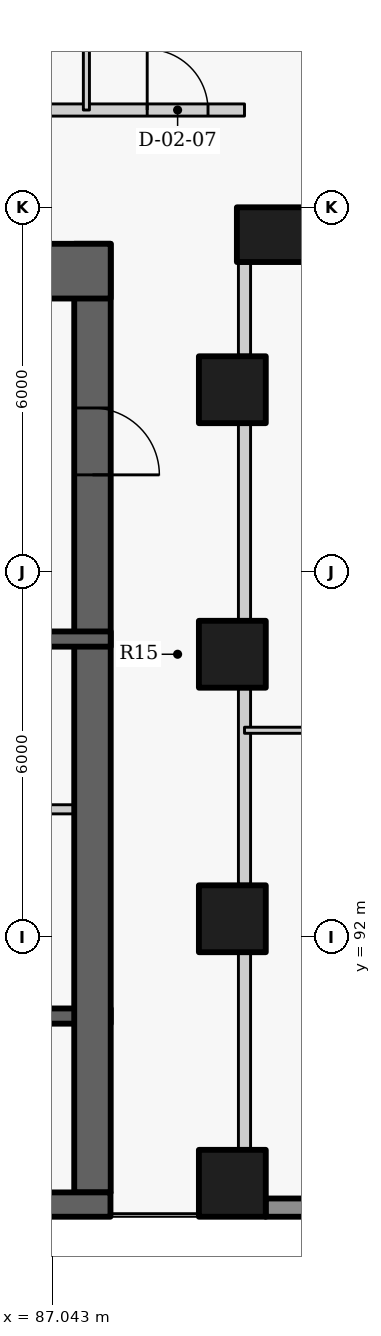
"""IFC4 building model, lengths in metres.
Left out: names, types, materials, properties, quantities, classifications, styles, units other than length and angle.
Written with IfcOpenShell. Run it as: python <this file> out.ifc"""

import sys

from ifc_helpers import new_model, si_unit, direction, frame, frame_2d, origin, origin_2d, place, context, subcontext, project, spatial, rectangle, extrude, element, fill, save


model = new_model("IFC4")
c1 = context("Model", 3, precision=1e-05, world=origin(), true_north=direction((0.0, 1.0)))
c2 = subcontext(c1, "Body", "Model", "MODEL_VIEW")
j1 = project(units=[si_unit("LENGTHUNIT", "METRE"), si_unit("PLANEANGLEUNIT", "RADIAN")], contexts=[c1])
p1 = place(None, origin())
s1 = spatial("IfcSite", under=j1, at=p1, CompositionType="ELEMENT")
p2 = place(p1, origin())
s2 = spatial("IfcBuilding", under=s1, at=p2, CompositionType="ELEMENT")
p3 = place(p2, frame((0.0, 0.0, 24.0)))
s3 = spatial("IfcBuildingStorey", under=s2, at=p3, CompositionType="ELEMENT", Elevation=24.0)
p4 = place(p3, frame((90.825, 103.55, 0.0), z_axis=(0.0, 0.0, 1.0), x_axis=(-1.0, 0.0, 0.0)))
e1 = element("IfcColumn", 1, at=p4, inside=s3, PredefinedType="COLUMN", context=c2, shape_type="SweptSolid", body=[
    extrude(rectangle(XDim=1.5, YDim=0.9, at=origin_2d()), origin(), (0.0, 0.0, 1.0), 4.2),
])
for number, where, z_axis, x_axis in (
    (2, (90.0, 87.95, 0.0), (0.0, 0.0, 1.0), (0.0, 1.0, 0.0)),
    (3, (90.0, 92.3, 0.0), (0.0, 0.0, 1.0), (0.0, 1.0, 0.0)),
    (4, (90.0, 96.65, 0.0), (0.0, 0.0, 1.0), (0.0, 1.0, 0.0)),
    (5, (90.0, 101.0, 0.0), (0.0, 0.0, 1.0), (0.0, 1.0, 0.0)),
):
    element("IfcColumn", number, at=place(p3, frame(where, z_axis=z_axis, x_axis=x_axis)), inside=s3, PredefinedType="COLUMN", context=c2, shape_type="SweptSolid", body=[
        extrude(rectangle(XDim=1.1, YDim=1.1, at=origin_2d()), origin(), (0.0, 0.0, 1.0), 4.2),
    ])
p5 = place(p3, frame((90.546, 87.55, 0.0), z_axis=(0.0, 0.0, 1.0), x_axis=(1.0, 0.0, 0.0)))
e6 = element("IfcWall", 6, at=p5, inside=s3, PredefinedType="SOLIDWALL", context=c2, shape_type="SweptSolid", body=[
    extrude(rectangle(XDim=6.016, YDim=0.3, at=frame_2d((3.008, 0.0))), origin(), (0.0, 0.0, 1.0), 3.325),
])
p6 = place(p5, frame((1.958, 0.0, 0.9)))
e7 = element("IfcOpeningElement", 7, at=p6, cuts=e6, PredefinedType="OPENING", context=c2, shape_type="SweptSolid", body=[
    extrude(rectangle(XDim=2.1, YDim=2.05, at=frame_2d((1.05, 1.025))), frame((0.0, 0.16, 0.0), z_axis=(0.0, -1.0, 0.0), x_axis=(1.0, 0.0, 0.0)), (0.0, 0.0, 1.0), 0.32),
])
p7 = place(p3, frame((88.0, 90.7, -0.3), z_axis=(0.0, 0.0, 1.0), x_axis=(-1.0, 0.0, 0.0)))
e8 = element("IfcWall", 8, at=p7, inside=s3, PredefinedType="SHEAR", context=c2, shape_type="SweptSolid", body=[
    extrude(rectangle(XDim=2.6, YDim=0.25, at=frame_2d((1.3, 0.0))), origin(), (0.0, 0.0, 1.0), 4.225),
])
p8 = place(p7, frame((1.175, 0.0, 0.3)))
e9 = element("IfcOpeningElement", 9, at=p8, cuts=e8, PredefinedType="OPENING", context=c2, shape_type="SweptSolid", body=[
    extrude(rectangle(XDim=0.9, YDim=2.1, at=frame_2d((0.45, 1.05))), frame((0.0, 0.135, 0.0), z_axis=(0.0, -1.0, 0.0), x_axis=(1.0, 0.0, 0.0)), (0.0, 0.0, 1.0), 0.27),
])
p9 = place(p3, frame((87.7, 103.4, -0.3), z_axis=(0.0, 0.0, 1.0), x_axis=(0.0, -1.0, 0.0)))
e10 = element("IfcWall", 10, at=p9, inside=s3, PredefinedType="SHEAR", context=c2, shape_type="SweptSolid", body=[
    extrude(rectangle(XDim=15.6, YDim=0.6, at=frame_2d((7.8, 0.0))), origin(), (0.0, 0.0, 1.0), 4.225),
])
p10 = place(p9, frame((2.7, 0.0, 0.3)))
e11 = element("IfcOpeningElement", 11, at=p10, cuts=e10, PredefinedType="OPENING", context=c2, shape_type="SweptSolid", body=[
    extrude(rectangle(XDim=1.1, YDim=2.1, at=frame_2d((0.55, 1.05))), frame((0.0, 0.31, 0.0), z_axis=(0.0, -1.0, 0.0), x_axis=(1.0, 0.0, 0.0)), (0.0, 0.0, 1.0), 0.62),
])
p11 = place(p3, frame((85.397, 94.1, 0.0), z_axis=(0.0, 0.0, 1.0), x_axis=(1.0, 0.0, 0.0)))
e12 = element("IfcWall", 12, at=p11, inside=s3, PredefinedType="PARTITIONING", context=c2, shape_type="SweptSolid", body=[
    extrude(rectangle(XDim=2.603, YDim=0.15, at=frame_2d((1.302, 0.0))), origin(), (0.0, 0.0, 1.0), 3.925),
])
p12 = place(p11, frame((0.528, 0.0, 0.0)))
e13 = element("IfcOpeningElement", 13, at=p12, cuts=e12, PredefinedType="OPENING", context=c2, shape_type="SweptSolid", body=[
    extrude(rectangle(XDim=0.9, YDim=2.1, at=frame_2d((0.45, 1.05))), frame((0.0, 0.085, 0.0), z_axis=(0.0, -1.0, 0.0), x_axis=(1.0, 0.0, 0.0)), (0.0, 0.0, 1.0), 0.17),
])
p13 = place(p3, frame((80.0, 96.9, -0.3), z_axis=(0.0, 0.0, 1.0), x_axis=(1.0, 0.0, 0.0)))
e14 = element("IfcWall", 14, at=p13, inside=s3, PredefinedType="SHEAR", context=c2, shape_type="SweptSolid", body=[
    extrude(rectangle(XDim=8.0, YDim=0.25, at=frame_2d((4.0, 0.0))), origin(), (0.0, 0.0, 1.0), 4.225),
])
p14 = place(p13, frame((3.849, 0.0, 0.3)))
e15 = element("IfcOpeningElement", 15, at=p14, cuts=e14, PredefinedType="OPENING", context=c2, shape_type="SweptSolid", body=[
    extrude(rectangle(XDim=1.1, YDim=2.1, at=frame_2d((0.55, 1.05))), frame((0.0, 0.135, 0.0), z_axis=(0.0, -1.0, 0.0), x_axis=(1.0, 0.0, 0.0)), (0.0, 0.0, 1.0), 0.27),
])
p15 = place(p3, frame((83.4, 102.95, -0.3), z_axis=(0.0, 0.0, 1.0), x_axis=(1.0, 0.0, 0.0)))
e16 = element("IfcWall", 16, at=p15, inside=s3, PredefinedType="SHEAR", context=c2, shape_type="SweptSolid", body=[
    extrude(rectangle(XDim=4.6, YDim=0.9, at=frame_2d((2.3, 0.0))), origin(), (0.0, 0.0, 1.0), 4.225),
])
p16 = place(p15, frame((1.748, 0.0, 0.3)))
e17 = element("IfcOpeningElement", 17, at=p16, cuts=e16, PredefinedType="OPENING", context=c2, shape_type="SweptSolid", body=[
    extrude(rectangle(XDim=1.1, YDim=2.1, at=frame_2d((0.55, 1.05))), frame((0.0, 0.46, 0.0), z_axis=(0.0, -1.0, 0.0), x_axis=(1.0, 0.0, 0.0)), (0.0, 0.0, 1.0), 0.92),
])
p17 = place(p3, frame((69.8, 105.6, 0.0), z_axis=(0.0, 0.0, 1.0), x_axis=(1.0, 0.0, 0.0)))
e18 = element("IfcWall", 18, at=p17, inside=s3, PredefinedType="PARTITIONING", context=c2, shape_type="SweptSolid", body=[
    extrude(rectangle(XDim=20.4, YDim=0.2, at=frame_2d((10.2, 0.0))), origin(), (0.0, 0.0, 1.0), 3.925),
])
p18 = place(p17, frame((0.602, 0.0, 0.0)))
e19 = element("IfcOpeningElement", 19, at=p18, cuts=e18, PredefinedType="OPENING", context=c2, shape_type="SweptSolid", body=[
    extrude(rectangle(XDim=1.0, YDim=2.1, at=frame_2d((0.5, 1.05))), frame((0.0, 0.11, 0.0), z_axis=(0.0, -1.0, 0.0), x_axis=(1.0, 0.0, 0.0)), (0.0, 0.0, 1.0), 0.22),
])
p19 = place(p17, frame((18.8, 0.0, 0.0)))
e20 = element("IfcOpeningElement", 20, at=p19, cuts=e18, PredefinedType="OPENING", context=c2, shape_type="SweptSolid", body=[
    extrude(rectangle(XDim=1.0, YDim=2.1, at=frame_2d((0.5, 1.05))), frame((0.0, 0.11, 0.0), z_axis=(0.0, -1.0, 0.0), x_axis=(1.0, 0.0, 0.0)), (0.0, 0.0, 1.0), 0.22),
])
p20 = place(p17, frame((10.3, 0.0, 0.0)))
e21 = element("IfcOpeningElement", 21, at=p20, cuts=e18, PredefinedType="OPENING", context=c2, shape_type="SweptSolid", body=[
    extrude(rectangle(XDim=1.0, YDim=2.1, at=frame_2d((0.5, 1.05))), frame((0.0, 0.11, 0.0), z_axis=(0.0, -1.0, 0.0), x_axis=(1.0, 0.0, 0.0)), (0.0, 0.0, 1.0), 0.22),
])
p21 = place(p3, frame((90.2, 88.517, 0.0), z_axis=(0.0, 0.0, 1.0), x_axis=(0.0, 1.0, 0.0)))
e22 = element("IfcWall", 22, at=p21, inside=s3, PredefinedType="PARTITIONING", context=c2, shape_type="SweptSolid", body=[
    extrude(rectangle(XDim=3.216, YDim=0.2, at=frame_2d((1.608, 0.0))), origin(), (0.0, 0.0, 1.0), 3.405),
])
for number, where, z_axis, x_axis in (
    (23, (90.2, 92.867, 0.0), (0.0, 0.0, 1.0), (0.0, 1.0, 0.0)),
    (24, (90.2, 97.217, 0.0), (0.0, 0.0, 1.0), (0.0, 1.0, 0.0)),
):
    element("IfcWall", number, at=place(p3, frame(where, z_axis=z_axis, x_axis=x_axis)), inside=s3, PredefinedType="PARTITIONING", context=c2, shape_type="SweptSolid", body=[
        extrude(rectangle(XDim=3.216, YDim=0.2, at=frame_2d((1.608, 0.0))), origin(), (0.0, 0.0, 1.0), 3.405),
    ])
p22 = place(p3, frame((90.2, 101.567, 0.0), z_axis=(0.0, 0.0, 1.0), x_axis=(0.0, 1.0, 0.0)))
e25 = element("IfcWall", 25, at=p22, inside=s3, PredefinedType="PARTITIONING", context=c2, shape_type="SweptSolid", body=[
    extrude(rectangle(XDim=1.516, YDim=0.2, at=frame_2d((0.758, 0.0))), origin(), (0.0, 0.0, 1.0), 3.925),
])
p23 = place(p3, frame((90.2, 95.4, 0.0), z_axis=(0.0, 0.0, 1.0), x_axis=(1.0, 0.0, 0.0)))
e26 = element("IfcWall", 26, at=p23, inside=s3, PredefinedType="PARTITIONING", context=c2, shape_type="SweptSolid", body=[
    extrude(rectangle(XDim=7.366, YDim=0.1, at=frame_2d((3.683, 0.0))), origin(), (0.0, 0.0, 1.0), 3.925),
])
p24 = place(p3, frame((87.6, 105.6, 0.0), z_axis=(0.0, 0.0, 1.0), x_axis=(0.0, 1.0, 0.0)))
e27 = element("IfcWall", 27, at=p24, inside=s3, PredefinedType="PARTITIONING", context=c2, shape_type="SweptSolid", body=[
    extrude(rectangle(XDim=7.1, YDim=0.1, at=frame_2d((3.55, 0.0))), origin(), (0.0, 0.0, 1.0), 3.925),
])
p25 = place(p3, frame((72.004, 87.6, -0.3), z_axis=(0.0, 0.0, 1.0), x_axis=(1.0, 0.0, 0.0)))
e28 = element("IfcWall", 28, at=p25, inside=s3, PredefinedType="SHEAR", context=c2, shape_type="SweptSolid", body=[
    extrude(rectangle(XDim=15.992, YDim=0.4, at=frame_2d((7.996, 0.0))), origin(), (0.0, 0.0, 1.0), 4.225),
])
p26 = place(p19, origin())
e29 = element("IfcDoor", 29, at=p26, inside=s3, OperationType="SINGLE_SWING_LEFT", PredefinedType="DOOR", context=c2, shape_type="SweptSolid", body=[
    extrude(rectangle(XDim=1.0, YDim=2.1, at=frame_2d((0.5, 1.05))), frame((0.0, 0.025, 0.0), z_axis=(0.0, -1.0, 0.0), x_axis=(1.0, 0.0, 0.0)), (0.0, 0.0, 1.0), 0.05),
])
fill(e20, e29)
p27 = place(p10, origin())
e30 = element("IfcDoor", 30, at=p27, inside=s3, OperationType="SINGLE_SWING_RIGHT", PredefinedType="DOOR", context=c2, shape_type="SweptSolid", body=[
    extrude(rectangle(XDim=1.1, YDim=2.1, at=frame_2d((0.55, 1.05))), frame((0.0, 0.025, 0.0), z_axis=(0.0, -1.0, 0.0), x_axis=(1.0, 0.0, 0.0)), (0.0, 0.0, 1.0), 0.05),
])
fill(e11, e30)
save(model, sys.argv[1])
